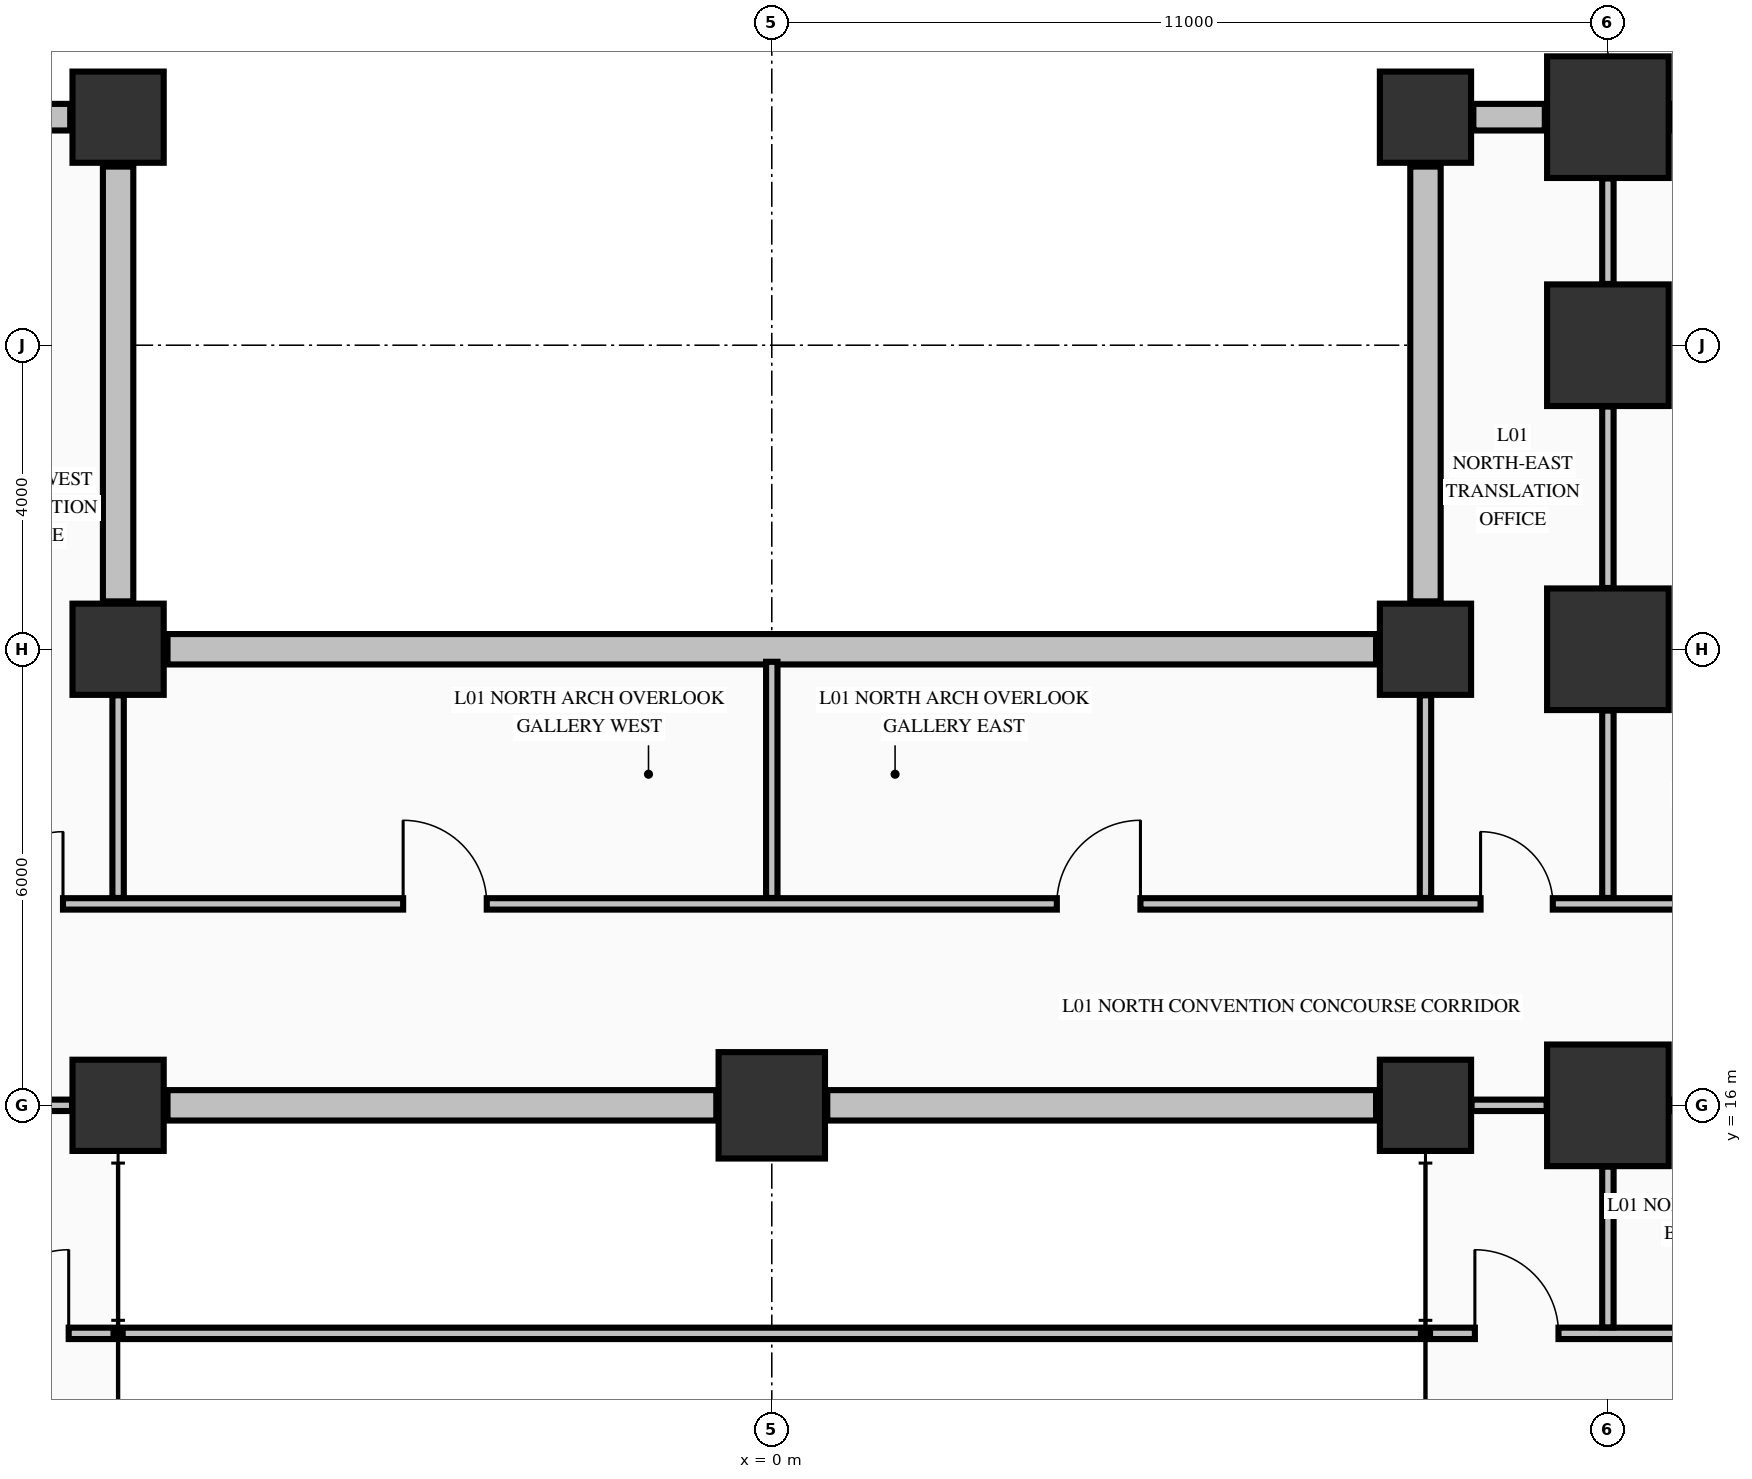
"""IFC4 building model, lengths in metres.
Left out: names, types, materials, properties, quantities, classifications, styles, units other than length and angle.
Written with IfcOpenShell. Run it as: python <this file> out.ifc"""

import sys

from ifc_helpers import new_model, si_unit, direction, frame, frame_2d, origin, origin_2d, place, context, subcontext, project, spatial, rectangle, extrude, element, fill, save


model = new_model("IFC4")
c1 = context("Model", 3, precision=1e-05, world=origin(), true_north=direction((0.0, 1.0)))
c2 = subcontext(c1, "Body", "Model", "MODEL_VIEW")
j1 = project(units=[si_unit("LENGTHUNIT", "METRE"), si_unit("PLANEANGLEUNIT", "RADIAN")], contexts=[c1])
p1 = place(None, origin())
s1 = spatial("IfcSite", under=j1, at=p1, CompositionType="ELEMENT")
p2 = place(p1, origin())
s2 = spatial("IfcBuilding", under=s1, at=p2, CompositionType="ELEMENT")
p3 = place(p2, frame((0.0, 0.0, 5.44)))
s3 = spatial("IfcBuildingStorey", under=s2, at=p3, CompositionType="ELEMENT", Elevation=5.44)
p4 = place(p3, frame((0.0, 16.0, 0.0), z_axis=(0.0, 0.0, 1.0), x_axis=(1.0, 0.0, 0.0)))
e1 = element("IfcColumn", 1, at=p4, inside=s3, PredefinedType="COLUMN", context=c2, shape_type="SweptSolid", body=[
    extrude(rectangle(XDim=1.4, YDim=1.4, at=origin_2d()), origin(), (0.0, 0.0, 1.0), 5.09),
])
for number, where, z_axis, x_axis in (
    (2, (11.0, 16.0, 0.0), (0.0, 0.0, 1.0), (1.0, 0.0, 0.0)),
    (3, (11.0, 22.0, 0.0), (0.0, 0.0, 1.0), (1.0, 0.0, 0.0)),
    (4, (11.0, 26.0, 0.0), (0.0, 0.0, 1.0), (1.0, 0.0, 0.0)),
    (5, (11.0, 29.0, 0.0), (0.0, 0.0, 1.0), (1.0, 0.0, 0.0)),
):
    element("IfcColumn", number, at=place(p3, frame(where, z_axis=z_axis, x_axis=x_axis)), inside=s3, PredefinedType="COLUMN", context=c2, shape_type="SweptSolid", body=[
        extrude(rectangle(XDim=1.6, YDim=1.6, at=origin_2d()), origin(), (0.0, 0.0, 1.0), 5.09),
    ])
for number, where, z_axis, x_axis in (
    (6, (-8.6, 16.0, 0.0), (0.0, 0.0, 1.0), (1.0, 0.0, 0.0)),
    (7, (8.6, 16.0, 0.0), (0.0, 0.0, 1.0), (1.0, 0.0, 0.0)),
    (8, (-8.6, 22.0, 0.0), (0.0, 0.0, 1.0), (1.0, 0.0, 0.0)),
    (9, (8.6, 22.0, 0.0), (0.0, 0.0, 1.0), (1.0, 0.0, 0.0)),
    (10, (-8.6, 29.0, 0.0), (0.0, 0.0, 1.0), (1.0, 0.0, 0.0)),
    (11, (8.6, 29.0, 0.0), (0.0, 0.0, 1.0), (1.0, 0.0, 0.0)),
):
    element("IfcColumn", number, at=place(p3, frame(where, z_axis=z_axis, x_axis=x_axis)), inside=s3, PredefinedType="COLUMN", context=c2, shape_type="SweptSolid", body=[
        extrude(rectangle(XDim=1.2, YDim=1.2, at=origin_2d()), origin(), (0.0, 0.0, 1.0), 5.09),
    ])
for number, where, z_axis, x_axis in (
    (12, (-9.23, 29.0, 0.0), (0.0, 0.0, 1.0), (-1.0, 0.0, 0.0)),
    (13, (10.17, 29.0, 0.0), (0.0, 0.0, 1.0), (-1.0, 0.0, 0.0)),
):
    element("IfcWall", number, at=place(p3, frame(where, z_axis=z_axis, x_axis=x_axis)), inside=s3, PredefinedType="STANDARD", context=c2, shape_type="SweptSolid", body=[
        extrude(rectangle(XDim=0.94, YDim=0.35, at=frame_2d((0.47, 0.0))), origin(), (0.0, 0.0, 1.0), 4.482),
    ])
p5 = place(p3, frame((19.17, 29.0, 0.0), z_axis=(0.0, 0.0, 1.0), x_axis=(-1.0, 0.0, 0.0)))
e14 = element("IfcWall", 14, at=p5, inside=s3, PredefinedType="STANDARD", context=c2, shape_type="SweptSolid", body=[
    extrude(rectangle(XDim=7.34, YDim=0.35, at=frame_2d((3.67, 0.0))), origin(), (0.0, 0.0, 1.0), 4.482),
])
p6 = place(p5, frame((2.47, 0.0, 0.85)))
e15 = element("IfcOpeningElement", 15, at=p6, cuts=e14, PredefinedType="OPENING", context=c2, shape_type="SweptSolid", body=[
    extrude(rectangle(XDim=2.4, YDim=2.1, at=frame_2d((1.2, 1.05))), frame((0.0, 0.185, 0.0), z_axis=(0.0, -1.0, 0.0), x_axis=(1.0, 0.0, 0.0)), (0.0, 0.0, 1.0), 0.37),
])
for number, where, z_axis, x_axis in (
    (16, (-7.95, 16.0, 0.0), (0.0, 0.0, 1.0), (1.0, 0.0, 0.0)),
    (17, (0.73, 16.0, 0.0), (0.0, 0.0, 1.0), (1.0, 0.0, 0.0)),
):
    element("IfcWall", number, at=place(p3, frame(where, z_axis=z_axis, x_axis=x_axis)), inside=s3, PredefinedType="STANDARD", context=c2, shape_type="SweptSolid", body=[
        extrude(rectangle(XDim=7.22, YDim=0.4, at=frame_2d((3.61, 0.0))), origin(), (0.0, 0.0, 1.0), 4.132),
    ])
for number, where, z_axis, x_axis in (
    (18, (-8.6, 22.63, 0.0), (0.0, 0.0, 1.0), (0.0, 1.0, 0.0)),
    (19, (8.6, 28.35, 0.0), (0.0, 0.0, 1.0), (0.0, -1.0, 0.0)),
):
    element("IfcWall", number, at=place(p3, frame(where, z_axis=z_axis, x_axis=x_axis)), inside=s3, PredefinedType="STANDARD", context=c2, shape_type="SweptSolid", body=[
        extrude(rectangle(XDim=5.72, YDim=0.4, at=frame_2d((2.86, 0.0))), origin(), (0.0, 0.0, 1.0), 4.132),
    ])
p7 = place(p3, frame((7.95, 22.0, 0.0), z_axis=(0.0, 0.0, 1.0), x_axis=(-1.0, 0.0, 0.0)))
e20 = element("IfcWall", 20, at=p7, inside=s3, PredefinedType="STANDARD", context=c2, shape_type="SweptSolid", body=[
    extrude(rectangle(XDim=15.9, YDim=0.4, at=frame_2d((7.95, 0.0))), origin(), (0.0, 0.0, 1.0), 4.132),
])
p8 = place(p3, frame((-20.075, 13.0, 0.0), z_axis=(0.0, 0.0, 1.0), x_axis=(1.0, 0.0, 0.0)))
e21 = element("IfcWall", 21, at=p8, inside=s3, PredefinedType="PARTITIONING", context=c2, shape_type="SweptSolid", body=[
    extrude(rectangle(XDim=11.415, YDim=0.15, at=frame_2d((5.708, 0.0))), origin(), (0.0, 0.0, 1.0), 5.09),
])
p9 = place(p8, frame((9.725, 0.0, 0.0)))
e22 = element("IfcOpeningElement", 22, at=p9, cuts=e21, PredefinedType="OPENING", context=c2, shape_type="SweptSolid", body=[
    extrude(rectangle(XDim=1.1, YDim=2.15, at=frame_2d((0.55, 1.075))), frame((0.0, 0.085, 0.0), z_axis=(0.0, -1.0, 0.0), x_axis=(1.0, 0.0, 0.0)), (0.0, 0.0, 1.0), 0.17),
])
p10 = place(p3, frame((-8.54, 13.0, 0.0), z_axis=(0.0, 0.0, 1.0), x_axis=(1.0, 0.0, 0.0)))
e23 = element("IfcWall", 23, at=p10, inside=s3, PredefinedType="PARTITIONING", context=c2, shape_type="SweptSolid", body=[
    extrude(rectangle(XDim=17.08, YDim=0.15, at=frame_2d((8.54, 0.0))), origin(), (0.0, 0.0, 1.0), 5.09),
])
p11 = place(p3, frame((8.66, 13.0, 0.0), z_axis=(0.0, 0.0, 1.0), x_axis=(1.0, 0.0, 0.0)))
e24 = element("IfcWall", 24, at=p11, inside=s3, PredefinedType="PARTITIONING", context=c2, shape_type="SweptSolid", body=[
    extrude(rectangle(XDim=11.415, YDim=0.15, at=frame_2d((5.708, 0.0))), origin(), (0.0, 0.0, 1.0), 5.09),
])
p12 = place(p11, frame((0.59, 0.0, 0.0)))
e25 = element("IfcOpeningElement", 25, at=p12, cuts=e24, PredefinedType="OPENING", context=c2, shape_type="SweptSolid", body=[
    extrude(rectangle(XDim=1.1, YDim=2.15, at=frame_2d((0.55, 1.075))), frame((0.0, 0.085, 0.0), z_axis=(0.0, -1.0, 0.0), x_axis=(1.0, 0.0, 0.0)), (0.0, 0.0, 1.0), 0.17),
])
for number, where, z_axis, x_axis in (
    (26, (-10.194, 16.0, 0.0), (0.0, 0.0, 1.0), (1.0, 0.0, 0.0)),
    (27, (9.206, 16.0, 0.0), (0.0, 0.0, 1.0), (1.0, 0.0, 0.0)),
):
    element("IfcWall", number, at=place(p3, frame(where, z_axis=z_axis, x_axis=x_axis)), inside=s3, PredefinedType="PARTITIONING", context=c2, shape_type="SweptSolid", body=[
        extrude(rectangle(XDim=0.988, YDim=0.15, at=frame_2d((0.494, 0.0))), origin(), (0.0, 0.0, 1.0), 4.132),
    ])
p13 = place(p3, frame((11.806, 16.0, 0.0), z_axis=(0.0, 0.0, 1.0), x_axis=(1.0, 0.0, 0.0)))
e28 = element("IfcWall", 28, at=p13, inside=s3, PredefinedType="PARTITIONING", context=c2, shape_type="SweptSolid", body=[
    extrude(rectangle(XDim=7.388, YDim=0.15, at=frame_2d((3.694, 0.0))), origin(), (0.0, 0.0, 1.0), 4.132),
])
p14 = place(p13, frame((3.144, 0.0, 0.0)))
e29 = element("IfcOpeningElement", 29, at=p14, cuts=e28, PredefinedType="OPENING", context=c2, shape_type="SweptSolid", body=[
    extrude(rectangle(XDim=1.1, YDim=2.15, at=frame_2d((0.55, 1.075))), frame((0.0, 0.085, 0.0), z_axis=(0.0, -1.0, 0.0), x_axis=(1.0, 0.0, 0.0)), (0.0, 0.0, 1.0), 0.17),
])
p15 = place(p3, frame((-33.835, 18.65, 0.0), z_axis=(0.0, 0.0, 1.0), x_axis=(1.0, 0.0, 0.0)))
e30 = element("IfcWall", 30, at=p15, inside=s3, PredefinedType="PARTITIONING", context=c2, shape_type="SweptSolid", body=[
    extrude(rectangle(XDim=63.685, YDim=0.15, at=frame_2d((31.843, 0.0))), origin(), (0.0, 0.0, 1.0), 5.09),
])
p16 = place(p15, frame((1.285, 0.0, 0.0)))
e31 = element("IfcOpeningElement", 31, at=p16, cuts=e30, PredefinedType="OPENING", context=c2, shape_type="SweptSolid", body=[
    extrude(rectangle(XDim=1.1, YDim=2.15, at=frame_2d((0.55, 1.075))), frame((0.0, 0.085, 0.0), z_axis=(0.0, -1.0, 0.0), x_axis=(1.0, 0.0, 0.0)), (0.0, 0.0, 1.0), 0.17),
])
p17 = place(p15, frame((5.285, 0.0, 0.0)))
e32 = element("IfcOpeningElement", 32, at=p17, cuts=e30, PredefinedType="OPENING", context=c2, shape_type="SweptSolid", body=[
    extrude(rectangle(XDim=1.1, YDim=2.15, at=frame_2d((0.55, 1.075))), frame((0.0, 0.085, 0.0), z_axis=(0.0, -1.0, 0.0), x_axis=(1.0, 0.0, 0.0)), (0.0, 0.0, 1.0), 0.17),
])
p18 = place(p15, frame((10.285, 0.0, 0.0)))
e33 = element("IfcOpeningElement", 33, at=p18, cuts=e30, PredefinedType="OPENING", context=c2, shape_type="SweptSolid", body=[
    extrude(rectangle(XDim=1.1, YDim=2.15, at=frame_2d((0.55, 1.075))), frame((0.0, 0.085, 0.0), z_axis=(0.0, -1.0, 0.0), x_axis=(1.0, 0.0, 0.0)), (0.0, 0.0, 1.0), 0.17),
])
p19 = place(p15, frame((17.785, 0.0, 0.0)))
e34 = element("IfcOpeningElement", 34, at=p19, cuts=e30, PredefinedType="OPENING", context=c2, shape_type="SweptSolid", body=[
    extrude(rectangle(XDim=1.1, YDim=2.15, at=frame_2d((0.55, 1.075))), frame((0.0, 0.085, 0.0), z_axis=(0.0, -1.0, 0.0), x_axis=(1.0, 0.0, 0.0)), (0.0, 0.0, 1.0), 0.17),
])
p20 = place(p15, frame((23.56, 0.0, 0.0)))
e35 = element("IfcOpeningElement", 35, at=p20, cuts=e30, PredefinedType="OPENING", context=c2, shape_type="SweptSolid", body=[
    extrude(rectangle(XDim=0.95, YDim=2.15, at=frame_2d((0.475, 1.075))), frame((0.0, 0.085, 0.0), z_axis=(0.0, -1.0, 0.0), x_axis=(1.0, 0.0, 0.0)), (0.0, 0.0, 1.0), 0.17),
])
p21 = place(p15, frame((28.985, 0.0, 0.0)))
e36 = element("IfcOpeningElement", 36, at=p21, cuts=e30, PredefinedType="OPENING", context=c2, shape_type="SweptSolid", body=[
    extrude(rectangle(XDim=1.1, YDim=2.15, at=frame_2d((0.55, 1.075))), frame((0.0, 0.085, 0.0), z_axis=(0.0, -1.0, 0.0), x_axis=(1.0, 0.0, 0.0)), (0.0, 0.0, 1.0), 0.17),
])
p22 = place(p15, frame((37.585, 0.0, 0.0)))
e37 = element("IfcOpeningElement", 37, at=p22, cuts=e30, PredefinedType="OPENING", context=c2, shape_type="SweptSolid", body=[
    extrude(rectangle(XDim=1.1, YDim=2.15, at=frame_2d((0.55, 1.075))), frame((0.0, 0.085, 0.0), z_axis=(0.0, -1.0, 0.0), x_axis=(1.0, 0.0, 0.0)), (0.0, 0.0, 1.0), 0.17),
])
p23 = place(p15, frame((43.16, 0.0, 0.0)))
e38 = element("IfcOpeningElement", 38, at=p23, cuts=e30, PredefinedType="OPENING", context=c2, shape_type="SweptSolid", body=[
    extrude(rectangle(XDim=0.95, YDim=2.15, at=frame_2d((0.475, 1.075))), frame((0.0, 0.085, 0.0), z_axis=(0.0, -1.0, 0.0), x_axis=(1.0, 0.0, 0.0)), (0.0, 0.0, 1.0), 0.17),
])
p24 = place(p15, frame((61.31, 0.0, 0.0)))
e39 = element("IfcOpeningElement", 39, at=p24, cuts=e30, PredefinedType="OPENING", context=c2, shape_type="SweptSolid", body=[
    extrude(rectangle(XDim=0.95, YDim=2.15, at=frame_2d((0.475, 1.075))), frame((0.0, 0.085, 0.0), z_axis=(0.0, -1.0, 0.0), x_axis=(1.0, 0.0, 0.0)), (0.0, 0.0, 1.0), 0.17),
])
p25 = place(p15, frame((47.56, 0.0, 0.0)))
e40 = element("IfcOpeningElement", 40, at=p25, cuts=e30, PredefinedType="OPENING", context=c2, shape_type="SweptSolid", body=[
    extrude(rectangle(XDim=0.95, YDim=2.15, at=frame_2d((0.475, 1.075))), frame((0.0, 0.085, 0.0), z_axis=(0.0, -1.0, 0.0), x_axis=(1.0, 0.0, 0.0)), (0.0, 0.0, 1.0), 0.17),
])
p26 = place(p15, frame((51.31, 0.0, 0.0)))
e41 = element("IfcOpeningElement", 41, at=p26, cuts=e30, PredefinedType="OPENING", context=c2, shape_type="SweptSolid", body=[
    extrude(rectangle(XDim=1.05, YDim=2.15, at=frame_2d((0.525, 1.075))), frame((0.0, 0.085, 0.0), z_axis=(0.0, -1.0, 0.0), x_axis=(1.0, 0.0, 0.0)), (0.0, 0.0, 1.0), 0.17),
])
p27 = place(p15, frame((56.06, 0.0, 0.0)))
e42 = element("IfcOpeningElement", 42, at=p27, cuts=e30, PredefinedType="OPENING", context=c2, shape_type="SweptSolid", body=[
    extrude(rectangle(XDim=0.95, YDim=2.15, at=frame_2d((0.475, 1.075))), frame((0.0, 0.085, 0.0), z_axis=(0.0, -1.0, 0.0), x_axis=(1.0, 0.0, 0.0)), (0.0, 0.0, 1.0), 0.17),
])
p28 = place(p15, frame((58.535, 0.0, 0.0)))
e43 = element("IfcOpeningElement", 43, at=p28, cuts=e30, PredefinedType="OPENING", context=c2, shape_type="SweptSolid", body=[
    extrude(rectangle(XDim=0.9, YDim=2.15, at=frame_2d((0.45, 1.075))), frame((0.0, 0.085, 0.0), z_axis=(0.0, -1.0, 0.0), x_axis=(1.0, 0.0, 0.0)), (0.0, 0.0, 1.0), 0.17),
])
p29 = place(p3, frame((-8.6, 18.728, 0.0), z_axis=(0.0, 0.0, 1.0), x_axis=(0.0, 1.0, 0.0)))
e44 = element("IfcWall", 44, at=p29, inside=s3, PredefinedType="PARTITIONING", context=c2, shape_type="SweptSolid", body=[
    extrude(rectangle(XDim=2.666, YDim=0.15, at=frame_2d((1.333, 0.0))), origin(), (0.0, 0.0, 1.0), 4.132),
])
p30 = place(p3, frame((0.0, 18.728, 0.0), z_axis=(0.0, 0.0, 1.0), x_axis=(0.0, 1.0, 0.0)))
e45 = element("IfcWall", 45, at=p30, inside=s3, PredefinedType="PARTITIONING", context=c2, shape_type="SweptSolid", body=[
    extrude(rectangle(XDim=3.107, YDim=0.15, at=frame_2d((1.553, 0.0))), origin(), (0.0, 0.0, 1.0), 5.09),
])
p31 = place(p3, frame((8.6, 18.728, 0.0), z_axis=(0.0, 0.0, 1.0), x_axis=(0.0, 1.0, 0.0)))
e46 = element("IfcWall", 46, at=p31, inside=s3, PredefinedType="PARTITIONING", context=c2, shape_type="SweptSolid", body=[
    extrude(rectangle(XDim=2.666, YDim=0.15, at=frame_2d((1.333, 0.0))), origin(), (0.0, 0.0, 1.0), 4.132),
])
p32 = place(p3, frame((11.0, 13.078, 0.0), z_axis=(0.0, 0.0, 1.0), x_axis=(0.0, 1.0, 0.0)))
e47 = element("IfcWall", 47, at=p32, inside=s3, PredefinedType="PARTITIONING", context=c2, shape_type="SweptSolid", body=[
    extrude(rectangle(XDim=2.116, YDim=0.15, at=frame_2d((1.058, 0.0))), origin(), (0.0, 0.0, 1.0), 4.132),
])
p33 = place(p3, frame((11.0, 18.728, 0.0), z_axis=(0.0, 0.0, 1.0), x_axis=(0.0, 1.0, 0.0)))
e48 = element("IfcWall", 48, at=p33, inside=s3, PredefinedType="PARTITIONING", context=c2, shape_type="SweptSolid", body=[
    extrude(rectangle(XDim=2.466, YDim=0.15, at=frame_2d((1.233, 0.0))), origin(), (0.0, 0.0, 1.0), 4.132),
])
p34 = place(p3, frame((11.0, 22.806, 0.0), z_axis=(0.0, 0.0, 1.0), x_axis=(0.0, 1.0, 0.0)))
e49 = element("IfcWall", 49, at=p34, inside=s3, PredefinedType="PARTITIONING", context=c2, shape_type="SweptSolid", body=[
    extrude(rectangle(XDim=2.388, YDim=0.15, at=frame_2d((1.194, 0.0))), origin(), (0.0, 0.0, 1.0), 4.132),
])
p35 = place(p3, frame((11.0, 26.806, 0.0), z_axis=(0.0, 0.0, 1.0), x_axis=(0.0, 1.0, 0.0)))
e50 = element("IfcWall", 50, at=p35, inside=s3, PredefinedType="PARTITIONING", context=c2, shape_type="SweptSolid", body=[
    extrude(rectangle(XDim=1.388, YDim=0.15, at=frame_2d((0.694, 0.0))), origin(), (0.0, 0.0, 1.0), 4.132),
])
p36 = place(p9, origin())
e51 = element("IfcDoor", 51, at=p36, inside=s3, OperationType="SINGLE_SWING_RIGHT", PredefinedType="DOOR", context=c2, shape_type="SweptSolid", body=[
    extrude(rectangle(XDim=1.1, YDim=2.15, at=frame_2d((0.55, 1.075))), frame((0.0, 0.025, 0.0), z_axis=(0.0, -1.0, 0.0), x_axis=(1.0, 0.0, 0.0)), (0.0, 0.0, 1.0), 0.05),
])
fill(e22, e51)
p37 = place(p12, origin())
e52 = element("IfcDoor", 52, at=p37, inside=s3, OperationType="SINGLE_SWING_LEFT", PredefinedType="DOOR", context=c2, shape_type="SweptSolid", body=[
    extrude(rectangle(XDim=1.1, YDim=2.15, at=frame_2d((0.55, 1.075))), frame((0.0, 0.025, 0.0), z_axis=(0.0, -1.0, 0.0), x_axis=(1.0, 0.0, 0.0)), (0.0, 0.0, 1.0), 0.05),
])
fill(e25, e52)
p38 = place(p20, origin())
e53 = element("IfcDoor", 53, at=p38, inside=s3, OperationType="SINGLE_SWING_RIGHT", PredefinedType="DOOR", context=c2, shape_type="SweptSolid", body=[
    extrude(rectangle(XDim=0.95, YDim=2.15, at=frame_2d((0.475, 1.075))), frame((0.0, 0.025, 0.0), z_axis=(0.0, -1.0, 0.0), x_axis=(1.0, 0.0, 0.0)), (0.0, 0.0, 1.0), 0.05),
])
fill(e35, e53)
p39 = place(p21, origin())
e54 = element("IfcDoor", 54, at=p39, inside=s3, OperationType="SINGLE_SWING_LEFT", PredefinedType="DOOR", context=c2, shape_type="SweptSolid", body=[
    extrude(rectangle(XDim=1.1, YDim=2.15, at=frame_2d((0.55, 1.075))), frame((0.0, 0.025, 0.0), z_axis=(0.0, -1.0, 0.0), x_axis=(1.0, 0.0, 0.0)), (0.0, 0.0, 1.0), 0.05),
])
fill(e36, e54)
p40 = place(p22, origin())
e55 = element("IfcDoor", 55, at=p40, inside=s3, OperationType="SINGLE_SWING_RIGHT", PredefinedType="DOOR", context=c2, shape_type="SweptSolid", body=[
    extrude(rectangle(XDim=1.1, YDim=2.15, at=frame_2d((0.55, 1.075))), frame((0.0, 0.025, 0.0), z_axis=(0.0, -1.0, 0.0), x_axis=(1.0, 0.0, 0.0)), (0.0, 0.0, 1.0), 0.05),
])
fill(e37, e55)
p41 = place(p23, origin())
e56 = element("IfcDoor", 56, at=p41, inside=s3, OperationType="SINGLE_SWING_LEFT", PredefinedType="DOOR", context=c2, shape_type="SweptSolid", body=[
    extrude(rectangle(XDim=0.95, YDim=2.15, at=frame_2d((0.475, 1.075))), frame((0.0, 0.025, 0.0), z_axis=(0.0, -1.0, 0.0), x_axis=(1.0, 0.0, 0.0)), (0.0, 0.0, 1.0), 0.05),
])
fill(e38, e56)
save(model, sys.argv[1])
